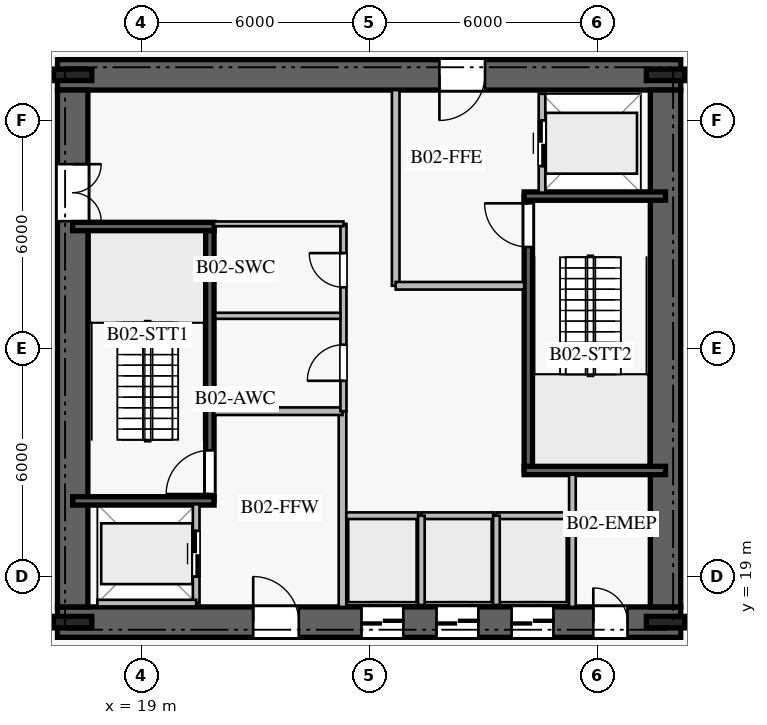
"""IFC4 building model, lengths in metres.
Left out: names, types, materials, properties, quantities, classifications, styles, units other than length and angle.
Written with IfcOpenShell. Run it as: python <this file> out.ifc"""

import sys

from ifc_helpers import new_model, si_unit, direction, frame, frame_2d, origin, origin_2d, place, context, subcontext, project, spatial, rectangle, i_section, extrude, element, fill, save


model = new_model("IFC4")
c1 = context("Model", 3, precision=1e-05, world=origin(), true_north=direction((0.0, 1.0)))
c2 = subcontext(c1, "Body", "Model", "MODEL_VIEW")
j1 = project(units=[si_unit("LENGTHUNIT", "METRE"), si_unit("PLANEANGLEUNIT", "RADIAN")], contexts=[c1])
p1 = place(None, origin())
s1 = spatial("IfcSite", under=j1, at=p1, CompositionType="ELEMENT")
p2 = place(p1, origin())
s2 = spatial("IfcBuilding", under=s1, at=p2, CompositionType="ELEMENT")
p3 = place(p2, frame((0.0, 0.0, -8.4)))
s3 = spatial("IfcBuildingStorey", under=s2, at=p3, CompositionType="ELEMENT", Elevation=-8.4)
p4 = place(p3, frame((16.8, 17.8, 0.0), z_axis=(0.0, 0.0, 1.0), x_axis=(1.0, 0.0, 0.0)))
e1 = element("IfcWall", 1, at=p4, inside=s3, PredefinedType="SHEAR", context=c2, shape_type="SweptSolid", body=[
    extrude(rectangle(XDim=16.4, YDim=0.8, at=frame_2d((8.2, 0.0))), origin(), (0.0, 0.0, 1.0), 3.88),
])
p5 = place(p4, frame((5.15, 0.0, 0.0)))
e2 = element("IfcOpeningElement", 2, at=p5, cuts=e1, PredefinedType="OPENING", context=c2, shape_type="SweptSolid", body=[
    extrude(rectangle(XDim=1.2, YDim=2.25, at=frame_2d((0.6, 1.125))), frame((0.0, 0.41, 0.0), z_axis=(0.0, -1.0, 0.0), x_axis=(1.0, 0.0, 0.0)), (0.0, 0.0, 1.0), 0.82),
])
p6 = place(p4, frame((14.1, 0.0, 0.0)))
e3 = element("IfcOpeningElement", 3, at=p6, cuts=e1, PredefinedType="OPENING", context=c2, shape_type="SweptSolid", body=[
    extrude(rectangle(XDim=0.9, YDim=2.1, at=frame_2d((0.45, 1.05))), frame((0.0, 0.41, 0.0), z_axis=(0.0, -1.0, 0.0), x_axis=(1.0, 0.0, 0.0)), (0.0, 0.0, 1.0), 0.82),
])
p7 = place(p4, frame((8.0, 0.0, 0.0)))
e4 = element("IfcOpeningElement", 4, at=p7, cuts=e1, PredefinedType="OPENING", context=c2, shape_type="SweptSolid", body=[
    extrude(rectangle(XDim=1.1, YDim=2.2, at=frame_2d((0.55, 1.1))), frame((0.0, 0.41, 0.0), z_axis=(0.0, -1.0, 0.0), x_axis=(1.0, 0.0, 0.0)), (0.0, 0.0, 1.0), 0.82),
])
p8 = place(p4, frame((9.975, 0.0, 0.0)))
e5 = element("IfcOpeningElement", 5, at=p8, cuts=e1, PredefinedType="OPENING", context=c2, shape_type="SweptSolid", body=[
    extrude(rectangle(XDim=1.1, YDim=2.2, at=frame_2d((0.55, 1.1))), frame((0.0, 0.41, 0.0), z_axis=(0.0, -1.0, 0.0), x_axis=(1.0, 0.0, 0.0)), (0.0, 0.0, 1.0), 0.82),
])
p9 = place(p4, frame((11.95, 0.0, 0.0)))
e6 = element("IfcOpeningElement", 6, at=p9, cuts=e1, PredefinedType="OPENING", context=c2, shape_type="SweptSolid", body=[
    extrude(rectangle(XDim=1.1, YDim=2.2, at=frame_2d((0.55, 1.1))), frame((0.0, 0.41, 0.0), z_axis=(0.0, -1.0, 0.0), x_axis=(1.0, 0.0, 0.0)), (0.0, 0.0, 1.0), 0.82),
])
p10 = place(p3, frame((33.2, 32.2, 0.0), z_axis=(0.0, 0.0, 1.0), x_axis=(-1.0, 0.0, 0.0)))
e7 = element("IfcWall", 7, at=p10, inside=s3, PredefinedType="SHEAR", context=c2, shape_type="SweptSolid", body=[
    extrude(rectangle(XDim=16.4, YDim=0.8, at=frame_2d((8.2, 0.0))), origin(), (0.0, 0.0, 1.0), 3.88),
])
p11 = place(p10, frame((5.15, 0.0, 0.0)))
e8 = element("IfcOpeningElement", 8, at=p11, cuts=e7, PredefinedType="OPENING", context=c2, shape_type="SweptSolid", body=[
    extrude(rectangle(XDim=1.2, YDim=2.25, at=frame_2d((0.6, 1.125))), frame((0.0, 0.41, 0.0), z_axis=(0.0, -1.0, 0.0), x_axis=(1.0, 0.0, 0.0)), (0.0, 0.0, 1.0), 0.82),
])
p12 = place(p3, frame((17.2, 31.8, 0.0), z_axis=(0.0, 0.0, 1.0), x_axis=(0.0, -1.0, 0.0)))
e9 = element("IfcWall", 9, at=p12, inside=s3, PredefinedType="SHEAR", context=c2, shape_type="SweptSolid", body=[
    extrude(rectangle(XDim=13.6, YDim=0.8, at=frame_2d((6.8, 0.0))), origin(), (0.0, 0.0, 1.0), 3.88),
])
p13 = place(p12, frame((1.95, 0.0, 0.0)))
e10 = element("IfcOpeningElement", 10, at=p13, cuts=e9, PredefinedType="OPENING", context=c2, shape_type="SweptSolid", body=[
    extrude(rectangle(XDim=1.5, YDim=2.2, at=frame_2d((0.75, 1.1))), frame((0.0, 0.41, 0.0), z_axis=(0.0, -1.0, 0.0), x_axis=(1.0, 0.0, 0.0)), (0.0, 0.0, 1.0), 0.82),
])
p14 = place(p3, frame((32.8, 18.2, 0.0), z_axis=(0.0, 0.0, 1.0), x_axis=(0.0, 1.0, 0.0)))
e11 = element("IfcWall", 11, at=p14, inside=s3, PredefinedType="SHEAR", context=c2, shape_type="SweptSolid", body=[
    extrude(rectangle(XDim=13.6, YDim=0.8, at=frame_2d((6.8, 0.0))), origin(), (0.0, 0.0, 1.0), 3.88),
])
for number, where, z_axis, x_axis in (
    (12, (17.2, 17.8, 0.0), (0.0, 0.0, 1.0), (1.0, 0.0, 0.0)),
    (13, (32.8, 17.8, 0.0), (0.0, 0.0, 1.0), (1.0, 0.0, 0.0)),
    (14, (32.8, 32.2, 0.0), (0.0, 0.0, 1.0), (1.0, 0.0, 0.0)),
    (15, (17.2, 32.2, 0.0), (0.0, 0.0, 1.0), (1.0, 0.0, 0.0)),
):
    element("IfcColumn", number, at=place(p3, frame(where, z_axis=z_axis, x_axis=x_axis)), inside=s3, PredefinedType="COLUMN", context=c2, shape_type="SweptSolid", body=[
        extrude(i_section(OverallWidth=0.302, OverallDepth=1.008, WebThickness=0.021, FlangeThickness=0.04, at=origin_2d()), origin(), (0.0, 0.0, 1.0), 4.2),
    ])
p15 = place(p3, frame((20.81, 20.99, 0.0), z_axis=(0.0, 0.0, 1.0), x_axis=(0.0, 1.0, 0.0)))
e16 = element("IfcWall", 16, at=p15, inside=s3, PredefinedType="SOLIDWALL", context=c2, shape_type="SweptSolid", body=[
    extrude(rectangle(XDim=7.22, YDim=0.22, at=frame_2d((3.61, 0.0))), origin(), (0.0, 0.0, 1.0), 3.88),
])
p16 = place(p15, frame((0.18, 0.0, 0.0)))
e17 = element("IfcOpeningElement", 17, at=p16, cuts=e16, PredefinedType="OPENING", context=c2, shape_type="SweptSolid", body=[
    extrude(rectangle(XDim=1.15, YDim=2.2, at=frame_2d((0.575, 1.1))), frame((0.0, 0.12, 0.0), z_axis=(0.0, -1.0, 0.0), x_axis=(1.0, 0.0, 0.0)), (0.0, 0.0, 1.0), 0.24),
])
for number, where, z_axis, x_axis in (
    (18, (17.2, 20.99, 0.0), (0.0, 0.0, 1.0), (1.0, 0.0, 0.0)),
    (19, (17.2, 28.21, 0.0), (0.0, 0.0, 1.0), (1.0, 0.0, 0.0)),
):
    element("IfcWall", number, at=place(p3, frame(where, z_axis=z_axis, x_axis=x_axis)), inside=s3, PredefinedType="SOLIDWALL", context=c2, shape_type="SweptSolid", body=[
        extrude(rectangle(XDim=3.72, YDim=0.22, at=frame_2d((1.86, 0.0))), origin(), (0.0, 0.0, 1.0), 3.88),
    ])
p17 = place(p3, frame((29.19, 21.79, 0.0), z_axis=(0.0, 0.0, 1.0), x_axis=(0.0, 1.0, 0.0)))
e20 = element("IfcWall", 20, at=p17, inside=s3, PredefinedType="SOLIDWALL", context=c2, shape_type="SweptSolid", body=[
    extrude(rectangle(XDim=7.22, YDim=0.22, at=frame_2d((3.61, 0.0))), origin(), (0.0, 0.0, 1.0), 3.88),
])
p18 = place(p17, frame((5.88, 0.0, 0.0)))
e21 = element("IfcOpeningElement", 21, at=p18, cuts=e20, PredefinedType="OPENING", context=c2, shape_type="SweptSolid", body=[
    extrude(rectangle(XDim=1.15, YDim=2.2, at=frame_2d((0.575, 1.1))), frame((0.0, 0.12, 0.0), z_axis=(0.0, -1.0, 0.0), x_axis=(1.0, 0.0, 0.0)), (0.0, 0.0, 1.0), 0.24),
])
for number, where, z_axis, x_axis in (
    (22, (29.08, 21.79, 0.0), (0.0, 0.0, 1.0), (1.0, 0.0, 0.0)),
    (23, (29.08, 29.01, 0.0), (0.0, 0.0, 1.0), (1.0, 0.0, 0.0)),
):
    element("IfcWall", number, at=place(p3, frame(where, z_axis=z_axis, x_axis=x_axis)), inside=s3, PredefinedType="SOLIDWALL", context=c2, shape_type="SweptSolid", body=[
        extrude(rectangle(XDim=3.72, YDim=0.22, at=frame_2d((1.86, 0.0))), origin(), (0.0, 0.0, 1.0), 3.88),
    ])
p19 = place(p3, frame((24.3, 18.2, 0.0), z_axis=(0.0, 0.0, 1.0), x_axis=(0.0, 1.0, 0.0)))
e24 = element("IfcWall", 24, at=p19, inside=s3, PredefinedType="PARTITIONING", context=c2, shape_type="SweptSolid", body=[
    extrude(rectangle(XDim=5.15, YDim=0.2, at=frame_2d((2.575, 0.0))), origin(), (0.0, 0.0, 1.0), 3.88),
])
p20 = place(p3, frame((20.92, 23.35, 0.0), z_axis=(0.0, 0.0, 1.0), x_axis=(1.0, 0.0, 0.0)))
e25 = element("IfcWall", 25, at=p20, inside=s3, PredefinedType="PARTITIONING", context=c2, shape_type="SweptSolid", body=[
    extrude(rectangle(XDim=3.38, YDim=0.2, at=frame_2d((1.69, 0.0))), origin(), (0.0, 0.0, 1.0), 3.88),
])
p21 = place(p3, frame((25.7, 26.65, 0.0), z_axis=(0.0, 0.0, 1.0), x_axis=(0.0, 1.0, 0.0)))
e26 = element("IfcWall", 26, at=p21, inside=s3, PredefinedType="PARTITIONING", context=c2, shape_type="SweptSolid", body=[
    extrude(rectangle(XDim=5.15, YDim=0.2, at=frame_2d((2.575, 0.0))), origin(), (0.0, 0.0, 1.0), 3.88),
])
p22 = place(p3, frame((25.7, 26.65, 0.0), z_axis=(0.0, 0.0, 1.0), x_axis=(1.0, 0.0, 0.0)))
e27 = element("IfcWall", 27, at=p22, inside=s3, PredefinedType="PARTITIONING", context=c2, shape_type="SweptSolid", body=[
    extrude(rectangle(XDim=3.38, YDim=0.2, at=frame_2d((1.69, 0.0))), origin(), (0.0, 0.0, 1.0), 3.88),
])
p23 = place(p3, frame((24.325, 23.35, 0.0), z_axis=(0.0, 0.0, 1.0), x_axis=(0.0, 1.0, 0.0)))
e28 = element("IfcWall", 28, at=p23, inside=s3, PredefinedType="PLUMBINGWALL", context=c2, shape_type="SweptSolid", body=[
    extrude(rectangle(XDim=4.93, YDim=0.16, at=frame_2d((2.465, 0.0))), origin(), (0.0, 0.0, 1.0), 3.88),
])
p24 = place(p23, frame((0.8, 0.0, 0.0)))
e29 = element("IfcOpeningElement", 29, at=p24, cuts=e28, PredefinedType="OPENING", context=c2, shape_type="SweptSolid", body=[
    extrude(rectangle(XDim=0.95, YDim=2.1, at=frame_2d((0.475, 1.05))), frame((0.0, 0.09, 0.0), z_axis=(0.0, -1.0, 0.0), x_axis=(1.0, 0.0, 0.0)), (0.0, 0.0, 1.0), 0.18),
])
p25 = place(p23, frame((3.26, 0.0, 0.0)))
e30 = element("IfcOpeningElement", 30, at=p25, cuts=e28, PredefinedType="OPENING", context=c2, shape_type="SweptSolid", body=[
    extrude(rectangle(XDim=0.9, YDim=2.1, at=frame_2d((0.45, 1.05))), frame((0.0, 0.09, 0.0), z_axis=(0.0, -1.0, 0.0), x_axis=(1.0, 0.0, 0.0)), (0.0, 0.0, 1.0), 0.18),
])
p26 = place(p3, frame((20.92, 28.28, 0.0), z_axis=(0.0, 0.0, 1.0), x_axis=(1.0, 0.0, 0.0)))
e31 = element("IfcWall", 31, at=p26, inside=s3, PredefinedType="PARTITIONING", context=c2, shape_type="SweptSolid", body=[
    extrude(rectangle(XDim=3.405, YDim=0.125, at=frame_2d((1.703, 0.0))), origin(), (0.0, 0.0, 1.0), 3.88),
])
p27 = place(p3, frame((20.95, 25.86, 0.0), z_axis=(0.0, 0.0, 1.0), x_axis=(1.0, 0.0, 0.0)))
e32 = element("IfcWall", 32, at=p27, inside=s3, PredefinedType="PLUMBINGWALL", context=c2, shape_type="SweptSolid", body=[
    extrude(rectangle(XDim=3.3, YDim=0.16, at=frame_2d((1.65, 0.0))), origin(), (0.0, 0.0, 1.0), 3.88),
])
p28 = place(p3, frame((30.35, 18.2, 0.0), z_axis=(0.0, 0.0, 1.0), x_axis=(0.0, 1.0, 0.0)))
e33 = element("IfcWall", 33, at=p28, inside=s3, PredefinedType="PARTITIONING", context=c2, shape_type="SweptSolid", body=[
    extrude(rectangle(XDim=3.48, YDim=0.175, at=frame_2d((1.74, 0.0))), origin(), (0.0, 0.0, 1.0), 3.88),
])
p29 = place(p3, frame((24.4, 20.6, 0.0), z_axis=(0.0, 0.0, 1.0), x_axis=(1.0, 0.0, 0.0)))
e34 = element("IfcWall", 34, at=p29, inside=s3, PredefinedType="PARTITIONING", context=c2, shape_type="SweptSolid", body=[
    extrude(rectangle(XDim=1.9, YDim=0.175, at=frame_2d((0.95, 0.0))), origin(), (0.0, 0.0, 1.0), 3.88),
])
p30 = place(p3, frame((26.375, 20.6, 0.0), z_axis=(0.0, 0.0, 1.0), x_axis=(1.0, 0.0, 0.0)))
e35 = element("IfcWall", 35, at=p30, inside=s3, PredefinedType="PARTITIONING", context=c2, shape_type="SweptSolid", body=[
    extrude(rectangle(XDim=1.9, YDim=0.175, at=frame_2d((0.95, 0.0))), origin(), (0.0, 0.0, 1.0), 3.88),
])
p31 = place(p3, frame((26.375, 18.25, 0.0), z_axis=(0.0, 0.0, 1.0), x_axis=(0.0, 1.0, 0.0)))
e36 = element("IfcWall", 36, at=p31, inside=s3, PredefinedType="PARTITIONING", context=c2, shape_type="SweptSolid", body=[
    extrude(rectangle(XDim=2.35, YDim=0.175, at=frame_2d((1.175, 0.0))), origin(), (0.0, 0.0, 1.0), 3.88),
])
p32 = place(p3, frame((28.35, 20.6, 0.0), z_axis=(0.0, 0.0, 1.0), x_axis=(1.0, 0.0, 0.0)))
e37 = element("IfcWall", 37, at=p32, inside=s3, PredefinedType="PARTITIONING", context=c2, shape_type="SweptSolid", body=[
    extrude(rectangle(XDim=1.9, YDim=0.175, at=frame_2d((0.95, 0.0))), origin(), (0.0, 0.0, 1.0), 3.88),
])
p33 = place(p3, frame((28.35, 18.25, 0.0), z_axis=(0.0, 0.0, 1.0), x_axis=(0.0, 1.0, 0.0)))
e38 = element("IfcWall", 38, at=p33, inside=s3, PredefinedType="PARTITIONING", context=c2, shape_type="SweptSolid", body=[
    extrude(rectangle(XDim=2.35, YDim=0.175, at=frame_2d((1.175, 0.0))), origin(), (0.0, 0.0, 1.0), 3.88),
])
p34 = place(p3, frame((20.45, 18.3, 0.0), z_axis=(0.0, 0.0, 1.0), x_axis=(0.0, 1.0, 0.0)))
e39 = element("IfcWall", 39, at=p34, inside=s3, PredefinedType="PARTITIONING", context=c2, shape_type="SweptSolid", body=[
    extrude(rectangle(XDim=2.6, YDim=0.175, at=frame_2d((1.3, 0.0))), origin(), (0.0, 0.0, 1.0), 3.88),
])
p35 = place(p34, frame((0.7, 0.0, 0.0)))
e40 = element("IfcOpeningElement", 40, at=p35, cuts=e39, PredefinedType="OPENING", context=c2, shape_type="SweptSolid", body=[
    extrude(rectangle(XDim=1.2, YDim=2.2, at=frame_2d((0.6, 1.1))), frame((0.0, 0.098, 0.0), z_axis=(0.0, -1.0, 0.0), x_axis=(1.0, 0.0, 0.0)), (0.0, 0.0, 1.0), 0.195),
])
p36 = place(p3, frame((17.85, 18.3, 0.0), z_axis=(0.0, 0.0, 1.0), x_axis=(1.0, 0.0, 0.0)))
e41 = element("IfcWall", 41, at=p36, inside=s3, PredefinedType="PARTITIONING", context=c2, shape_type="SweptSolid", body=[
    extrude(rectangle(XDim=2.6, YDim=0.175, at=frame_2d((1.3, 0.0))), origin(), (0.0, 0.0, 1.0), 3.88),
])
p37 = place(p3, frame((29.55, 29.1, 0.0), z_axis=(0.0, 0.0, 1.0), x_axis=(0.0, 1.0, 0.0)))
e42 = element("IfcWall", 42, at=p37, inside=s3, PredefinedType="PARTITIONING", context=c2, shape_type="SweptSolid", body=[
    extrude(rectangle(XDim=2.6, YDim=0.175, at=frame_2d((1.3, 0.0))), origin(), (0.0, 0.0, 1.0), 3.88),
])
p38 = place(p37, frame((0.7, 0.0, 0.0)))
e43 = element("IfcOpeningElement", 43, at=p38, cuts=e42, PredefinedType="OPENING", context=c2, shape_type="SweptSolid", body=[
    extrude(rectangle(XDim=1.2, YDim=2.2, at=frame_2d((0.6, 1.1))), frame((0.0, 0.098, 0.0), z_axis=(0.0, -1.0, 0.0), x_axis=(1.0, 0.0, 0.0)), (0.0, 0.0, 1.0), 0.195),
])
p39 = place(p16, origin())
e44 = element("IfcDoor", 44, at=p39, inside=s3, OperationType="SINGLE_SWING_LEFT", PredefinedType="DOOR", context=c2, shape_type="SweptSolid", body=[
    extrude(rectangle(XDim=1.15, YDim=2.2, at=frame_2d((0.575, 1.1))), frame((0.0, 0.025, 0.0), z_axis=(0.0, -1.0, 0.0), x_axis=(1.0, 0.0, 0.0)), (0.0, 0.0, 1.0), 0.05),
])
fill(e17, e44)
p40 = place(p18, origin())
e45 = element("IfcDoor", 45, at=p40, inside=s3, OperationType="SINGLE_SWING_RIGHT", PredefinedType="DOOR", context=c2, shape_type="SweptSolid", body=[
    extrude(rectangle(XDim=1.15, YDim=2.2, at=frame_2d((0.575, 1.1))), frame((0.0, 0.025, 0.0), z_axis=(0.0, -1.0, 0.0), x_axis=(1.0, 0.0, 0.0)), (0.0, 0.0, 1.0), 0.05),
])
fill(e21, e45)
p41 = place(p5, origin())
e46 = element("IfcDoor", 46, at=p41, inside=s3, OperationType="SINGLE_SWING_LEFT", PredefinedType="DOOR", context=c2, shape_type="SweptSolid", body=[
    extrude(rectangle(XDim=1.2, YDim=2.25, at=frame_2d((0.6, 1.125))), frame((0.0, 0.025, 0.0), z_axis=(0.0, -1.0, 0.0), x_axis=(1.0, 0.0, 0.0)), (0.0, 0.0, 1.0), 0.05),
])
fill(e2, e46)
p42 = place(p11, origin())
e47 = element("IfcDoor", 47, at=p42, inside=s3, OperationType="SINGLE_SWING_RIGHT", PredefinedType="DOOR", context=c2, shape_type="SweptSolid", body=[
    extrude(rectangle(XDim=1.2, YDim=2.25, at=frame_2d((0.6, 1.125))), frame((0.0, 0.025, 0.0), z_axis=(0.0, -1.0, 0.0), x_axis=(1.0, 0.0, 0.0)), (0.0, 0.0, 1.0), 0.05),
])
fill(e8, e47)
p43 = place(p13, origin())
e48 = element("IfcDoor", 48, at=p43, inside=s3, OperationType="DOUBLE_DOOR_SINGLE_SWING", PredefinedType="DOOR", context=c2, shape_type="SweptSolid", body=[
    extrude(rectangle(XDim=1.5, YDim=2.2, at=frame_2d((0.75, 1.1))), frame((0.0, 0.025, 0.0), z_axis=(0.0, -1.0, 0.0), x_axis=(1.0, 0.0, 0.0)), (0.0, 0.0, 1.0), 0.05),
])
fill(e10, e48)
p44 = place(p24, origin())
e49 = element("IfcDoor", 49, at=p44, inside=s3, OperationType="SINGLE_SWING_LEFT", PredefinedType="DOOR", context=c2, shape_type="SweptSolid", body=[
    extrude(rectangle(XDim=0.95, YDim=2.1, at=frame_2d((0.475, 1.05))), frame((0.0, 0.025, 0.0), z_axis=(0.0, -1.0, 0.0), x_axis=(1.0, 0.0, 0.0)), (0.0, 0.0, 1.0), 0.05),
])
fill(e29, e49)
p45 = place(p25, origin())
e50 = element("IfcDoor", 50, at=p45, inside=s3, OperationType="SINGLE_SWING_RIGHT", PredefinedType="DOOR", context=c2, shape_type="SweptSolid", body=[
    extrude(rectangle(XDim=0.9, YDim=2.1, at=frame_2d((0.45, 1.05))), frame((0.0, 0.025, 0.0), z_axis=(0.0, -1.0, 0.0), x_axis=(1.0, 0.0, 0.0)), (0.0, 0.0, 1.0), 0.05),
])
fill(e30, e50)
p46 = place(p6, origin())
e51 = element("IfcDoor", 51, at=p46, inside=s3, OperationType="SINGLE_SWING_LEFT", PredefinedType="DOOR", context=c2, shape_type="SweptSolid", body=[
    extrude(rectangle(XDim=0.9, YDim=2.1, at=frame_2d((0.45, 1.05))), frame((0.0, 0.025, 0.0), z_axis=(0.0, -1.0, 0.0), x_axis=(1.0, 0.0, 0.0)), (0.0, 0.0, 1.0), 0.05),
])
fill(e3, e51)
p47 = place(p7, origin())
e52 = element("IfcDoor", 52, at=p47, inside=s3, OperationType="DOUBLE_DOOR_SLIDING", PredefinedType="DOOR", context=c2, shape_type="SweptSolid", body=[
    extrude(rectangle(XDim=1.1, YDim=2.2, at=frame_2d((0.55, 1.1))), frame((0.0, 0.025, 0.0), z_axis=(0.0, -1.0, 0.0), x_axis=(1.0, 0.0, 0.0)), (0.0, 0.0, 1.0), 0.05),
])
fill(e4, e52)
p48 = place(p8, origin())
e53 = element("IfcDoor", 53, at=p48, inside=s3, OperationType="DOUBLE_DOOR_SLIDING", PredefinedType="DOOR", context=c2, shape_type="SweptSolid", body=[
    extrude(rectangle(XDim=1.1, YDim=2.2, at=frame_2d((0.55, 1.1))), frame((0.0, 0.025, 0.0), z_axis=(0.0, -1.0, 0.0), x_axis=(1.0, 0.0, 0.0)), (0.0, 0.0, 1.0), 0.05),
])
fill(e5, e53)
p49 = place(p9, origin())
e54 = element("IfcDoor", 54, at=p49, inside=s3, OperationType="DOUBLE_DOOR_SLIDING", PredefinedType="DOOR", context=c2, shape_type="SweptSolid", body=[
    extrude(rectangle(XDim=1.1, YDim=2.2, at=frame_2d((0.55, 1.1))), frame((0.0, 0.025, 0.0), z_axis=(0.0, -1.0, 0.0), x_axis=(1.0, 0.0, 0.0)), (0.0, 0.0, 1.0), 0.05),
])
fill(e6, e54)
p50 = place(p35, origin())
e55 = element("IfcDoor", 55, at=p50, inside=s3, OperationType="DOUBLE_DOOR_SLIDING", PredefinedType="DOOR", context=c2, shape_type="SweptSolid", body=[
    extrude(rectangle(XDim=1.2, YDim=2.2, at=frame_2d((0.6, 1.1))), frame((0.0, 0.025, 0.0), z_axis=(0.0, -1.0, 0.0), x_axis=(1.0, 0.0, 0.0)), (0.0, 0.0, 1.0), 0.05),
])
fill(e40, e55)
p51 = place(p38, origin())
e56 = element("IfcDoor", 56, at=p51, inside=s3, OperationType="DOUBLE_DOOR_SLIDING", PredefinedType="DOOR", context=c2, shape_type="SweptSolid", body=[
    extrude(rectangle(XDim=1.2, YDim=2.2, at=frame_2d((0.6, 1.1))), frame((0.0, 0.025, 0.0), z_axis=(0.0, -1.0, 0.0), x_axis=(1.0, 0.0, 0.0)), (0.0, 0.0, 1.0), 0.05),
])
fill(e43, e56)
save(model, sys.argv[1])
